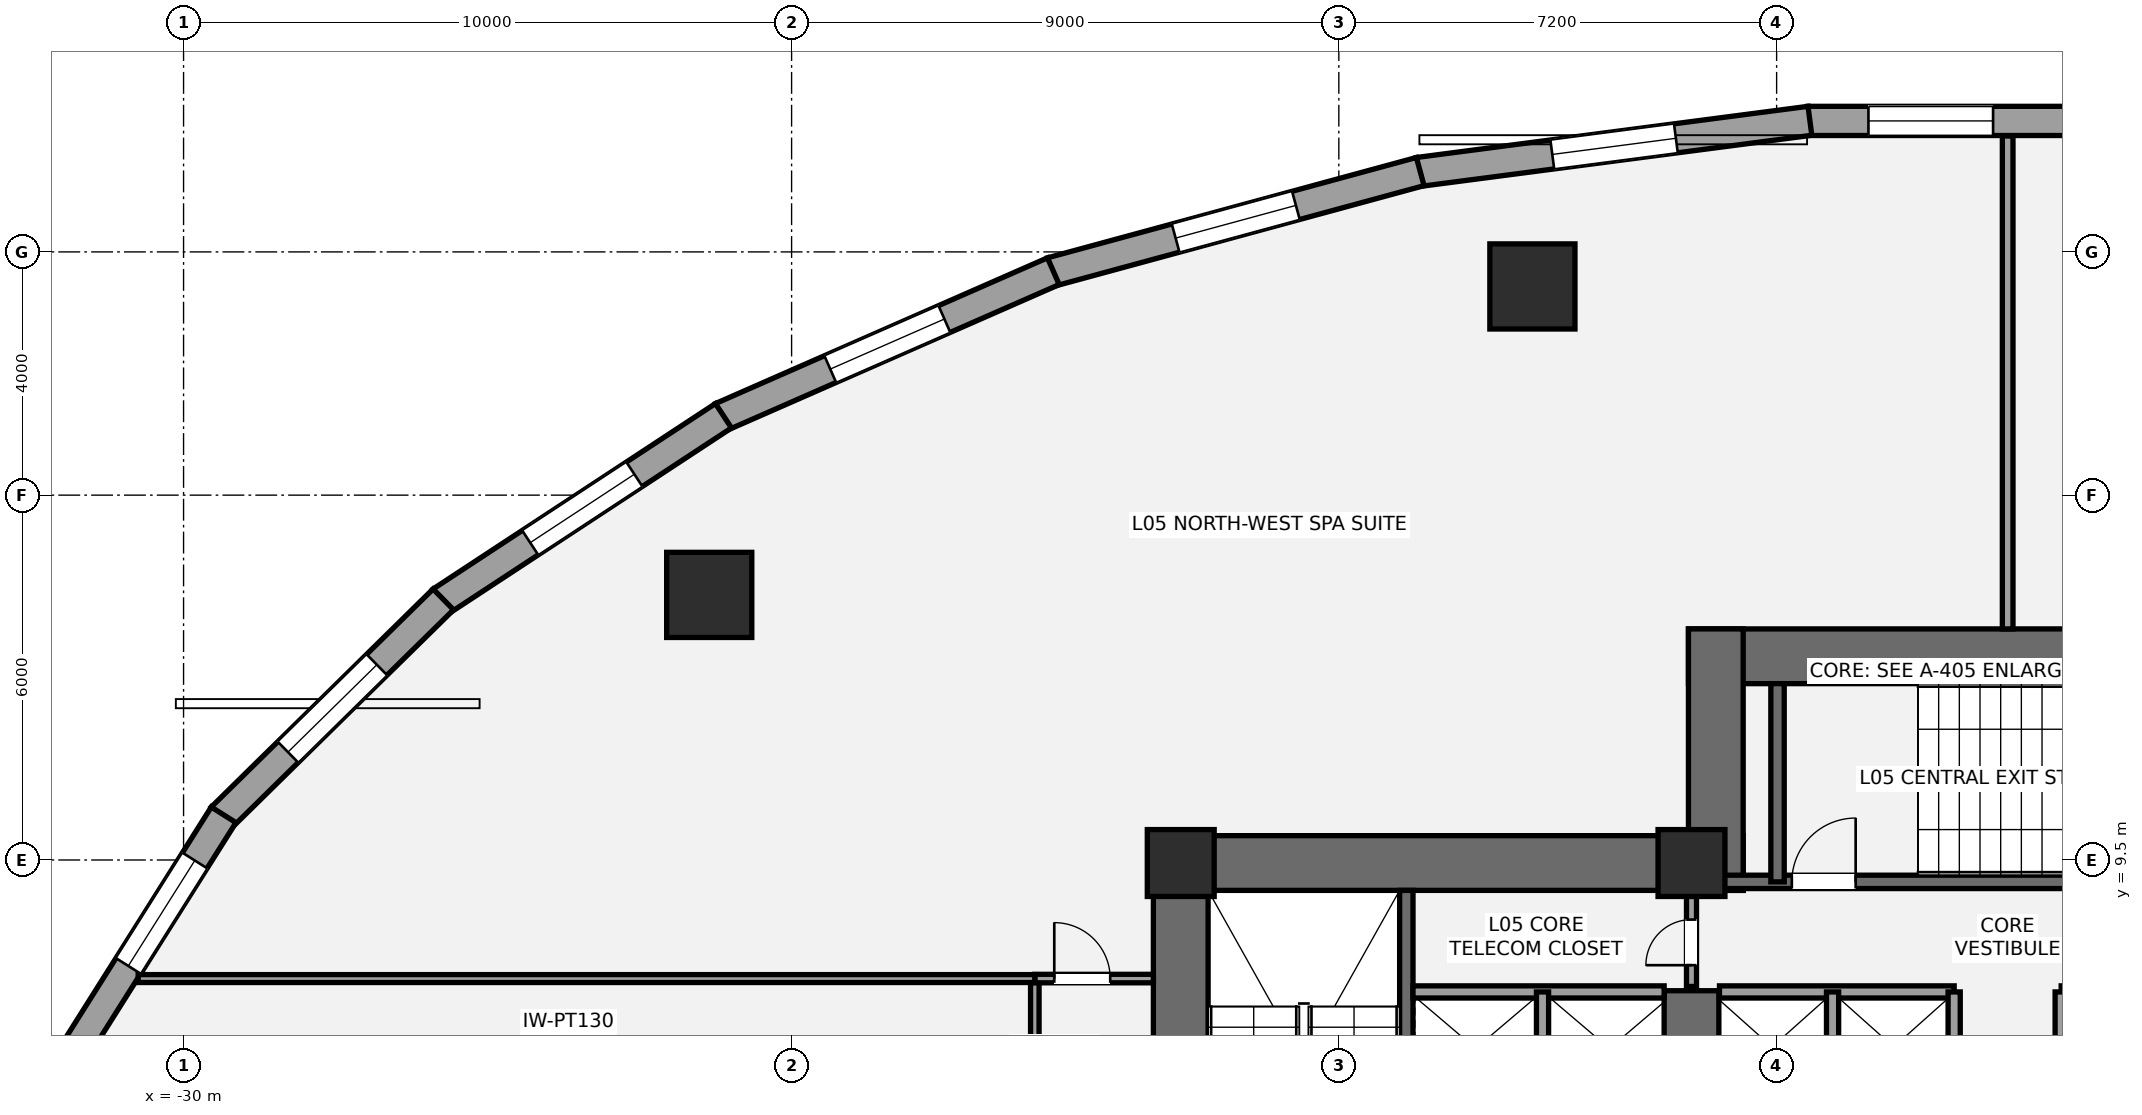
"""IFC4 building model, lengths in metres.
Left out: names, types, materials, properties, quantities, classifications, styles, units other than length and angle.
Written with IfcOpenShell. Run it as: python <this file> out.ifc"""

import sys

from ifc_helpers import new_model, si_unit, direction, frame, frame_2d, origin, origin_2d, place, context, subcontext, project, spatial, rectangle, hollow_circle, extrude, element, fill, save


model = new_model("IFC4")
c1 = context("Model", 3, precision=1e-05, world=origin(), true_north=direction((0.0, 1.0)))
c2 = subcontext(c1, "Body", "Model", "MODEL_VIEW")
j1 = project(units=[si_unit("LENGTHUNIT", "METRE"), si_unit("PLANEANGLEUNIT", "RADIAN")], contexts=[c1])
p1 = place(None, origin())
s1 = spatial("IfcSite", under=j1, at=p1, CompositionType="ELEMENT")
p2 = place(p1, origin())
s2 = spatial("IfcBuilding", under=s1, at=p2, CompositionType="ELEMENT")
p3 = place(p2, frame((0.0, 0.0, 22.8)))
s3 = spatial("IfcBuildingStorey", under=s2, at=p3, CompositionType="ELEMENT", Elevation=22.8)
p4 = place(p3, frame((-13.6, 0.95, 0.0), z_axis=(0.0, 0.0, 1.0), x_axis=(0.0, 1.0, 0.0)))
e1 = element("IfcWall", 1, at=p4, inside=s3, PredefinedType="SHEAR", context=c2, shape_type="SweptSolid", body=[
    extrude(rectangle(XDim=8.95, YDim=0.9, at=frame_2d((4.475, 0.0))), origin(), (0.0, 0.0, 1.0), 4.2),
])
p5 = place(p3, frame((-14.05, 9.45, 0.0), z_axis=(0.0, 0.0, 1.0), x_axis=(1.0, 0.0, 0.0)))
e2 = element("IfcWall", 2, at=p5, inside=s3, PredefinedType="SHEAR", context=c2, shape_type="SweptSolid", body=[
    extrude(rectangle(XDim=9.7, YDim=0.9, at=frame_2d((4.85, 0.0))), origin(), (0.0, 0.0, 1.0), 4.2),
])
p6 = place(p3, frame((-5.2, 5.35, 0.0), z_axis=(0.0, 0.0, 1.0), x_axis=(0.0, 1.0, 0.0)))
e3 = element("IfcWall", 3, at=p6, inside=s3, PredefinedType="SHEAR", context=c2, shape_type="SweptSolid", body=[
    extrude(rectangle(XDim=2.0, YDim=0.9, at=frame_2d((1.0, 0.0))), origin(), (0.0, 0.0, 1.0), 4.2),
])
p7 = place(p3, frame((-9.89, 1.85, 0.0), z_axis=(0.0, 0.0, 1.0), x_axis=(0.0, 1.0, 0.0)))
e4 = element("IfcWall", 4, at=p7, inside=s3, PredefinedType="SHEAR", context=c2, shape_type="SweptSolid", body=[
    extrude(rectangle(XDim=7.15, YDim=0.22, at=frame_2d((3.575, 0.0))), origin(), (0.0, 0.0, 1.0), 4.2),
])
p8 = place(p3, frame((-5.25, 12.85, 0.0), z_axis=(0.0, 0.0, 1.0), x_axis=(1.0, 0.0, 0.0)))
e5 = element("IfcWall", 5, at=p8, inside=s3, PredefinedType="SHEAR", context=c2, shape_type="SweptSolid", body=[
    extrude(rectangle(XDim=10.5, YDim=0.9, at=frame_2d((5.25, 0.0))), origin(), (0.0, 0.0, 1.0), 4.2),
])
p9 = place(p3, frame((-4.8, 9.0, 0.0), z_axis=(0.0, 0.0, 1.0), x_axis=(0.0, 1.0, 0.0)))
e6 = element("IfcWall", 6, at=p9, inside=s3, PredefinedType="SHEAR", context=c2, shape_type="SweptSolid", body=[
    extrude(rectangle(XDim=4.3, YDim=0.9, at=frame_2d((2.15, 0.0))), origin(), (0.0, 0.0, 1.0), 4.2),
])
p10 = place(p3, frame((-4.7, 9.14, 0.0), z_axis=(0.0, 0.0, 1.0), x_axis=(1.0, 0.0, 0.0)))
e7 = element("IfcWall", 7, at=p10, inside=s3, PredefinedType="SHEAR", context=c2, shape_type="SweptSolid", body=[
    extrude(rectangle(XDim=9.3, YDim=0.22, at=frame_2d((4.65, 0.0))), origin(), (0.0, 0.0, 1.0), 4.2),
])
p11 = place(p10, frame((1.15, 0.0, 0.0)))
e8 = element("IfcOpeningElement", 8, at=p11, cuts=e7, PredefinedType="OPENING", context=c2, shape_type="SweptSolid", body=[
    extrude(rectangle(XDim=1.05, YDim=2.15, at=frame_2d((0.525, 1.075))), frame((0.0, 0.12, 0.0), z_axis=(0.0, -1.0, 0.0), x_axis=(1.0, 0.0, 0.0)), (0.0, 0.0, 1.0), 0.24),
])
p12 = place(p3, frame((-3.785, 9.14, 0.0), z_axis=(0.0, 0.0, 1.0), x_axis=(0.0, 1.0, 0.0)))
e9 = element("IfcWall", 9, at=p12, inside=s3, PredefinedType="SHEAR", context=c2, shape_type="SweptSolid", body=[
    extrude(rectangle(XDim=3.26, YDim=0.22, at=frame_2d((1.63, 0.0))), origin(), (0.0, 0.0, 1.0), 4.2),
])
for number, where, z_axis, x_axis in (
    (10, (-13.6, 9.45, 0.0), (0.0, 0.0, 1.0), (1.0, 0.0, 0.0)),
    (11, (-5.2, 9.45, 0.0), (0.0, 0.0, 1.0), (1.0, 0.0, 0.0)),
):
    element("IfcColumn", number, at=place(p3, frame(where, z_axis=z_axis, x_axis=x_axis)), inside=s3, PredefinedType="COLUMN", context=c2, shape_type="SweptSolid", body=[
        extrude(rectangle(XDim=1.1, YDim=1.1, at=origin_2d()), origin(), (0.0, 0.0, 1.0), 4.2),
    ])
for number, where, z_axis, x_axis in (
    (12, (-7.816, 18.932, 0.0), (0.0, 0.0, 1.0), (1.0, 0.0, 0.0)),
    (13, (-21.354, 13.859, 0.0), (0.0, 0.0, 1.0), (1.0, 0.0, 0.0)),
):
    element("IfcColumn", number, at=place(p3, frame(where, z_axis=z_axis, x_axis=x_axis)), inside=s3, PredefinedType="USERDEFINED", context=c2, shape_type="SweptSolid", body=[
        extrude(hollow_circle(Radius=0.7, WallThickness=0.05, at=origin_2d()), origin(), (0.0, 0.0, 1.0), 4.13),
    ])
p13 = place(p3, frame((-3.284, 21.654, 0.0), z_axis=(0.0, 0.0, 1.0), x_axis=(1.0, 0.0, 0.0)))
e14 = element("IfcWall", 14, at=p13, inside=s3, PredefinedType="STANDARD", context=c2, shape_type="SweptSolid", body=[
    extrude(rectangle(XDim=6.567, YDim=0.48, at=frame_2d((3.284, 0.0))), origin(), (0.0, 0.0, 1.0), 3.033),
])
p14 = place(p13, frame((0.994, 0.0, 0.72)))
e15 = element("IfcOpeningElement", 15, at=p14, cuts=e14, PredefinedType="OPENING", context=c2, shape_type="SweptSolid", body=[
    extrude(rectangle(XDim=2.05, YDim=1.8, at=frame_2d((1.025, 0.9))), frame((0.0, 0.25, 0.0), z_axis=(0.0, -1.0, 0.0), x_axis=(1.0, 0.0, 0.0)), (0.0, 0.0, 1.0), 0.5),
])
p15 = place(p3, frame((-9.693, 20.815, 0.0), z_axis=(0.0, 0.0, 1.0), x_axis=(0.991576921472, 0.129519144545, 0.0)))
e16 = element("IfcWall", 16, at=p15, inside=s3, PredefinedType="STANDARD", context=c2, shape_type="SweptSolid", body=[
    extrude(rectangle(XDim=6.496, YDim=0.48, at=frame_2d((3.248, 0.0))), origin(), (0.0, 0.0, 1.0), 3.033),
])
p16 = place(p15, frame((2.223, 0.0, 0.72)))
e17 = element("IfcOpeningElement", 17, at=p16, cuts=e16, PredefinedType="OPENING", context=c2, shape_type="SweptSolid", body=[
    extrude(rectangle(XDim=2.05, YDim=1.8, at=frame_2d((1.025, 0.9))), frame((0.0, 0.25, 0.0), z_axis=(0.0, -1.0, 0.0), x_axis=(1.0, 0.0, 0.0)), (0.0, 0.0, 1.0), 0.5),
])
p17 = place(p3, frame((-15.729, 19.171, 0.0), z_axis=(0.0, 0.0, 1.0), x_axis=(0.964936550718, 0.262483243445, 0.0)))
e18 = element("IfcWall", 18, at=p17, inside=s3, PredefinedType="STANDARD", context=c2, shape_type="SweptSolid", body=[
    extrude(rectangle(XDim=6.288, YDim=0.48, at=frame_2d((3.144, 0.0))), origin(), (0.0, 0.0, 1.0), 3.033),
])
p18 = place(p17, frame((2.119, 0.0, 0.72)))
e19 = element("IfcOpeningElement", 19, at=p18, cuts=e18, PredefinedType="OPENING", context=c2, shape_type="SweptSolid", body=[
    extrude(rectangle(XDim=2.05, YDim=1.8, at=frame_2d((1.025, 0.9))), frame((0.0, 0.25, 0.0), z_axis=(0.0, -1.0, 0.0), x_axis=(1.0, 0.0, 0.0)), (0.0, 0.0, 1.0), 0.5),
])
p19 = place(p3, frame((-21.156, 16.786, 0.0), z_axis=(0.0, 0.0, 1.0), x_axis=(0.91570760638, 0.401845218484, 0.0)))
e20 = element("IfcWall", 20, at=p19, inside=s3, PredefinedType="STANDARD", context=c2, shape_type="SweptSolid", body=[
    extrude(rectangle(XDim=5.963, YDim=0.48, at=frame_2d((2.981, 0.0))), origin(), (0.0, 0.0, 1.0), 3.033),
])
p20 = place(p19, frame((1.957, 0.0, 0.72)))
e21 = element("IfcOpeningElement", 21, at=p20, cuts=e20, PredefinedType="OPENING", context=c2, shape_type="SweptSolid", body=[
    extrude(rectangle(XDim=2.05, YDim=1.8, at=frame_2d((1.025, 0.9))), frame((0.0, 0.25, 0.0), z_axis=(0.0, -1.0, 0.0), x_axis=(1.0, 0.0, 0.0)), (0.0, 0.0, 1.0), 0.5),
])
p21 = place(p3, frame((-25.764, 13.756, 0.0), z_axis=(0.0, 0.0, 1.0), x_axis=(0.835863918172, 0.548936708827, 0.0)))
e22 = element("IfcWall", 22, at=p21, inside=s3, PredefinedType="STANDARD", context=c2, shape_type="SweptSolid", body=[
    extrude(rectangle(XDim=5.555, YDim=0.48, at=frame_2d((2.778, 0.0))), origin(), (0.0, 0.0, 1.0), 3.033),
])
p22 = place(p21, frame((1.753, 0.0, 0.72)))
e23 = element("IfcOpeningElement", 23, at=p22, cuts=e22, PredefinedType="OPENING", context=c2, shape_type="SweptSolid", body=[
    extrude(rectangle(XDim=2.05, YDim=1.8, at=frame_2d((1.025, 0.9))), frame((0.0, 0.25, 0.0), z_axis=(0.0, -1.0, 0.0), x_axis=(1.0, 0.0, 0.0)), (0.0, 0.0, 1.0), 0.5),
])
p23 = place(p3, frame((-29.376, 10.199, 0.0), z_axis=(0.0, 0.0, 1.0), x_axis=(0.713189080178, 0.700971708355, 0.0)))
e24 = element("IfcWall", 24, at=p23, inside=s3, PredefinedType="STANDARD", context=c2, shape_type="SweptSolid", body=[
    extrude(rectangle(XDim=5.116, YDim=0.48, at=frame_2d((2.558, 0.0))), origin(), (0.0, 0.0, 1.0), 3.033),
])
p24 = place(p23, frame((1.533, 0.0, 0.72)))
e25 = element("IfcOpeningElement", 25, at=p24, cuts=e24, PredefinedType="OPENING", context=c2, shape_type="SweptSolid", body=[
    extrude(rectangle(XDim=2.05, YDim=1.8, at=frame_2d((1.025, 0.9))), frame((0.0, 0.25, 0.0), z_axis=(0.0, -1.0, 0.0), x_axis=(1.0, 0.0, 0.0)), (0.0, 0.0, 1.0), 0.5),
])
p25 = place(p3, frame((-31.854, 6.258, 0.0), z_axis=(0.0, 0.0, 1.0), x_axis=(0.53349762721, 0.845801561693, 0.0)))
e26 = element("IfcWall", 26, at=p25, inside=s3, PredefinedType="STANDARD", context=c2, shape_type="SweptSolid", body=[
    extrude(rectangle(XDim=4.711, YDim=0.48, at=frame_2d((2.355, 0.0))), origin(), (0.0, 0.0, 1.0), 3.033),
])
p26 = place(p25, frame((1.773, 0.0, 0.72)))
e27 = element("IfcOpeningElement", 27, at=p26, cuts=e26, PredefinedType="OPENING", context=c2, shape_type="SweptSolid", body=[
    extrude(rectangle(XDim=2.05, YDim=1.8, at=frame_2d((1.025, 0.9))), frame((0.0, 0.25, 0.0), z_axis=(0.0, -1.0, 0.0), x_axis=(1.0, 0.0, 0.0)), (0.0, 0.0, 1.0), 0.5),
])
p27 = place(p3, frame((-9.78, 7.33, 0.0), z_axis=(0.0, 0.0, 1.0), x_axis=(1.0, 0.0, 0.0)))
e28 = element("IfcWall", 28, at=p27, inside=s3, PredefinedType="SOLIDWALL", context=c2, shape_type="SweptSolid", body=[
    extrude(rectangle(XDim=4.13, YDim=0.2, at=frame_2d((2.065, 0.0))), origin(), (0.0, 0.0, 1.0), 3.9),
])
p28 = place(p3, frame((-7.65, 5.47, 0.0), z_axis=(0.0, 0.0, 1.0), x_axis=(0.0, 1.0, 0.0)))
e29 = element("IfcWall", 29, at=p28, inside=s3, PredefinedType="SOLIDWALL", context=c2, shape_type="SweptSolid", body=[
    extrude(rectangle(XDim=1.86, YDim=0.2, at=frame_2d((0.93, 0.0))), origin(), (0.0, 0.0, 1.0), 3.9),
])
for number, where, z_axis, x_axis in (
    (30, (-4.74, 7.33, 0.0), (0.0, 0.0, 1.0), (1.0, 0.0, 0.0)),
    (31, (0.88, 7.33, 0.0), (0.0, 0.0, 1.0), (1.0, 0.0, 0.0)),
):
    element("IfcWall", number, at=place(p3, frame(where, z_axis=z_axis, x_axis=x_axis)), inside=s3, PredefinedType="SOLIDWALL", context=c2, shape_type="SweptSolid", body=[
        extrude(rectangle(XDim=3.86, YDim=0.2, at=frame_2d((1.93, 0.0))), origin(), (0.0, 0.0, 1.0), 3.9),
    ])
for number, where, z_axis, x_axis in (
    (32, (-2.88, 5.52, 0.0), (0.0, 0.0, 1.0), (0.0, 1.0, 0.0)),
    (33, (-0.88, 5.52, 0.0), (0.0, 0.0, 1.0), (0.0, 1.0, 0.0)),
    (34, (0.88, 5.52, 0.0), (0.0, 0.0, 1.0), (0.0, 1.0, 0.0)),
):
    element("IfcWall", number, at=place(p3, frame(where, z_axis=z_axis, x_axis=x_axis)), inside=s3, PredefinedType="SOLIDWALL", context=c2, shape_type="SweptSolid", body=[
        extrude(rectangle(XDim=1.81, YDim=0.2, at=frame_2d((0.905, 0.0))), origin(), (0.0, 0.0, 1.0), 3.9),
    ])
p29 = place(p3, frame((-5.2, 7.42, 0.0), z_axis=(0.0, 0.0, 1.0), x_axis=(0.0, 1.0, 0.0)))
e35 = element("IfcWall", 35, at=p29, inside=s3, PredefinedType="PARTITIONING", context=c2, shape_type="SweptSolid", body=[
    extrude(rectangle(XDim=1.58, YDim=0.165, at=frame_2d((0.79, 0.0))), origin(), (0.0, 0.0, 1.0), 3.9),
])
p30 = place(p29, frame((0.35, 0.0, 0.0)))
e36 = element("IfcOpeningElement", 36, at=p30, cuts=e35, PredefinedType="OPENING", context=c2, shape_type="SweptSolid", body=[
    extrude(rectangle(XDim=0.75, YDim=2.1, at=frame_2d((0.375, 1.05))), frame((0.0, 0.093, 0.0), z_axis=(0.0, -1.0, 0.0), x_axis=(1.0, 0.0, 0.0)), (0.0, 0.0, 1.0), 0.185),
])
p31 = place(p3, frame((-16.0, -18.778, 0.0), z_axis=(0.0, 0.0, 1.0), x_axis=(0.0, 1.0, 0.0)))
e37 = element("IfcWall", 37, at=p31, inside=s3, PredefinedType="PARTITIONING", context=c2, shape_type="SweptSolid", body=[
    extrude(rectangle(XDim=26.328, YDim=0.14, at=frame_2d((13.164, 0.0))), origin(), (0.0, 0.0, 1.0), 2.09),
])
p32 = place(p31, frame((14.378, 0.0, 0.0)))
e38 = element("IfcOpeningElement", 38, at=p32, cuts=e37, PredefinedType="OPENING", context=c2, shape_type="SweptSolid", body=[
    extrude(rectangle(XDim=0.85, YDim=2.0, at=frame_2d((0.425, 1.0))), frame((0.0, 0.08, 0.0), z_axis=(0.0, -1.0, 0.0), x_axis=(1.0, 0.0, 0.0)), (0.0, 0.0, 1.0), 0.16),
])
p33 = place(p31, frame((19.128, 0.0, 0.0)))
e39 = element("IfcOpeningElement", 39, at=p33, cuts=e37, PredefinedType="OPENING", context=c2, shape_type="SweptSolid", body=[
    extrude(rectangle(XDim=0.85, YDim=2.0, at=frame_2d((0.425, 1.0))), frame((0.0, 0.08, 0.0), z_axis=(0.0, -1.0, 0.0), x_axis=(1.0, 0.0, 0.0)), (0.0, 0.0, 1.0), 0.16),
])
p34 = place(p31, frame((23.803, 0.0, 0.0)))
e40 = element("IfcOpeningElement", 40, at=p34, cuts=e37, PredefinedType="OPENING", context=c2, shape_type="SweptSolid", body=[
    extrude(rectangle(XDim=0.85, YDim=2.0, at=frame_2d((0.425, 1.0))), frame((0.0, 0.08, 0.0), z_axis=(0.0, -1.0, 0.0), x_axis=(1.0, 0.0, 0.0)), (0.0, 0.0, 1.0), 0.16),
])
p35 = place(p3, frame((-16.0, 7.55, 0.0), z_axis=(0.0, 0.0, 1.0), x_axis=(1.0, 0.0, 0.0)))
e41 = element("IfcWall", 41, at=p35, inside=s3, PredefinedType="PARTITIONING", context=c2, shape_type="SweptSolid", body=[
    extrude(rectangle(XDim=1.95, YDim=0.14, at=frame_2d((0.975, 0.0))), origin(), (0.0, 0.0, 1.0), 3.9),
])
p36 = place(p35, frame((0.32, 0.0, 0.0)))
e42 = element("IfcOpeningElement", 42, at=p36, cuts=e41, PredefinedType="OPENING", context=c2, shape_type="SweptSolid", body=[
    extrude(rectangle(XDim=0.92, YDim=2.15, at=frame_2d((0.46, 1.075))), frame((0.0, 0.08, 0.0), z_axis=(0.0, -1.0, 0.0), x_axis=(1.0, 0.0, 0.0)), (0.0, 0.0, 1.0), 0.16),
])
p37 = place(p3, frame((0.0, 13.3, 0.0), z_axis=(0.0, 0.0, 1.0), x_axis=(0.0, 1.0, 0.0)))
e43 = element("IfcWall", 43, at=p37, inside=s3, PredefinedType="PARTITIONING", context=c2, shape_type="SweptSolid", body=[
    extrude(rectangle(XDim=8.106, YDim=0.175, at=frame_2d((4.053, 0.0))), origin(), (0.0, 0.0, 1.0), 2.09),
])
p38 = place(p3, frame((-30.747, 7.55, 0.0), z_axis=(0.0, 0.0, 1.0), x_axis=(1.0, 0.0, 0.0)))
e44 = element("IfcWall", 44, at=p38, inside=s3, PredefinedType="PARTITIONING", context=c2, shape_type="SweptSolid", body=[
    extrude(rectangle(XDim=14.747, YDim=0.13, at=frame_2d((7.373, 0.0))), origin(), (0.0, 0.0, 1.0), 2.09),
])
p39 = place(p14, origin())
e45 = element("IfcWindow", 45, at=p39, inside=s3, PartitioningType="SINGLE_PANEL", PredefinedType="WINDOW", context=c2, shape_type="SweptSolid", body=[
    extrude(rectangle(XDim=2.05, YDim=1.8, at=frame_2d((1.025, 0.9))), frame((0.0, -0.01, 0.0), z_axis=(0.0, -1.0, 0.0), x_axis=(1.0, 0.0, 0.0)), (0.0, 0.0, 1.0), 0.06),
])
fill(e15, e45)
p40 = place(p16, origin())
e46 = element("IfcWindow", 46, at=p40, inside=s3, PartitioningType="SINGLE_PANEL", PredefinedType="WINDOW", context=c2, shape_type="SweptSolid", body=[
    extrude(rectangle(XDim=2.05, YDim=1.8, at=frame_2d((1.025, 0.9))), frame((0.0, -0.01, 0.0), z_axis=(0.0, -1.0, 0.0), x_axis=(1.0, 0.0, 0.0)), (0.0, 0.0, 1.0), 0.06),
])
fill(e17, e46)
p41 = place(p18, origin())
e47 = element("IfcWindow", 47, at=p41, inside=s3, PartitioningType="SINGLE_PANEL", PredefinedType="WINDOW", context=c2, shape_type="SweptSolid", body=[
    extrude(rectangle(XDim=2.05, YDim=1.8, at=frame_2d((1.025, 0.9))), frame((0.0, -0.01, 0.0), z_axis=(0.0, -1.0, 0.0), x_axis=(1.0, 0.0, 0.0)), (0.0, 0.0, 1.0), 0.06),
])
fill(e19, e47)
p42 = place(p20, origin())
e48 = element("IfcWindow", 48, at=p42, inside=s3, PartitioningType="SINGLE_PANEL", PredefinedType="WINDOW", context=c2, shape_type="SweptSolid", body=[
    extrude(rectangle(XDim=2.05, YDim=1.8, at=frame_2d((1.025, 0.9))), frame((0.0, -0.01, 0.0), z_axis=(0.0, -1.0, 0.0), x_axis=(1.0, 0.0, 0.0)), (0.0, 0.0, 1.0), 0.06),
])
fill(e21, e48)
p43 = place(p22, origin())
e49 = element("IfcWindow", 49, at=p43, inside=s3, PartitioningType="SINGLE_PANEL", PredefinedType="WINDOW", context=c2, shape_type="SweptSolid", body=[
    extrude(rectangle(XDim=2.05, YDim=1.8, at=frame_2d((1.025, 0.9))), frame((0.0, -0.01, 0.0), z_axis=(0.0, -1.0, 0.0), x_axis=(1.0, 0.0, 0.0)), (0.0, 0.0, 1.0), 0.06),
])
fill(e23, e49)
p44 = place(p24, origin())
e50 = element("IfcWindow", 50, at=p44, inside=s3, PartitioningType="SINGLE_PANEL", PredefinedType="WINDOW", context=c2, shape_type="SweptSolid", body=[
    extrude(rectangle(XDim=2.05, YDim=1.8, at=frame_2d((1.025, 0.9))), frame((0.0, -0.01, 0.0), z_axis=(0.0, -1.0, 0.0), x_axis=(1.0, 0.0, 0.0)), (0.0, 0.0, 1.0), 0.06),
])
fill(e25, e50)
p45 = place(p26, origin())
e51 = element("IfcWindow", 51, at=p45, inside=s3, PartitioningType="SINGLE_PANEL", PredefinedType="WINDOW", context=c2, shape_type="SweptSolid", body=[
    extrude(rectangle(XDim=2.05, YDim=1.8, at=frame_2d((1.025, 0.9))), frame((0.0, -0.01, 0.0), z_axis=(0.0, -1.0, 0.0), x_axis=(1.0, 0.0, 0.0)), (0.0, 0.0, 1.0), 0.06),
])
fill(e27, e51)
p46 = place(p11, origin())
e52 = element("IfcDoor", 52, at=p46, inside=s3, OperationType="SINGLE_SWING_RIGHT", PredefinedType="DOOR", context=c2, shape_type="SweptSolid", body=[
    extrude(rectangle(XDim=1.05, YDim=2.15, at=frame_2d((0.525, 1.075))), frame((0.0, 0.025, 0.0), z_axis=(0.0, -1.0, 0.0), x_axis=(1.0, 0.0, 0.0)), (0.0, 0.0, 1.0), 0.05),
])
fill(e8, e52)
p47 = place(p30, origin())
e53 = element("IfcDoor", 53, at=p47, inside=s3, OperationType="SINGLE_SWING_LEFT", PredefinedType="DOOR", context=c2, shape_type="SweptSolid", body=[
    extrude(rectangle(XDim=0.75, YDim=2.1, at=frame_2d((0.375, 1.05))), frame((0.0, 0.025, 0.0), z_axis=(0.0, -1.0, 0.0), x_axis=(1.0, 0.0, 0.0)), (0.0, 0.0, 1.0), 0.05),
])
fill(e36, e53)
p48 = place(p36, origin())
e54 = element("IfcDoor", 54, at=p48, inside=s3, OperationType="SINGLE_SWING_LEFT", PredefinedType="DOOR", context=c2, shape_type="SweptSolid", body=[
    extrude(rectangle(XDim=0.92, YDim=2.15, at=frame_2d((0.46, 1.075))), frame((0.0, 0.025, 0.0), z_axis=(0.0, -1.0, 0.0), x_axis=(1.0, 0.0, 0.0)), (0.0, 0.0, 1.0), 0.05),
])
fill(e42, e54)
save(model, sys.argv[1])
